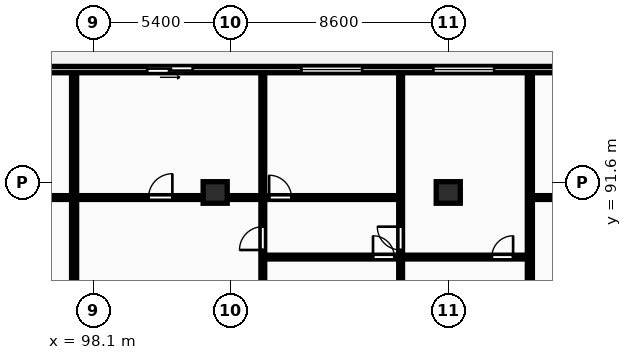
"""IFC4 building model, lengths in metres.
Left out: names, types, materials, properties, quantities, classifications, styles, units other than length and angle.
Written with IfcOpenShell. Run it as: python <this file> out.ifc"""

import sys

from ifc_helpers import new_model, si_unit, direction, frame, frame_2d, origin, origin_2d, place, context, subcontext, project, spatial, rectangle, extrude, element, fill, save


model = new_model("IFC4")
c1 = context("Model", 3, precision=1e-05, world=origin(), true_north=direction((0.0, 1.0)))
c2 = subcontext(c1, "Body", "Model", "MODEL_VIEW")
j1 = project(units=[si_unit("LENGTHUNIT", "METRE"), si_unit("PLANEANGLEUNIT", "RADIAN")], contexts=[c1])
p1 = place(None, origin())
s1 = spatial("IfcSite", under=j1, at=p1, CompositionType="ELEMENT")
p2 = place(p1, origin())
s2 = spatial("IfcBuilding", under=s1, at=p2, CompositionType="ELEMENT")
p3 = place(p2, frame((0.0, 0.0, 119.8)))
s3 = spatial("IfcBuildingStorey", under=s2, at=p3, CompositionType="ELEMENT", Elevation=119.8)
for number, where, z_axis, x_axis in (
    (1, (102.9, 91.2, 0.0), (0.0, 0.0, 1.0), (1.0, 0.0, 0.0)),
    (2, (112.1, 91.2, 0.0), (0.0, 0.0, 1.0), (1.0, 0.0, 0.0)),
):
    element("IfcColumn", number, at=place(p3, frame(where, z_axis=z_axis, x_axis=x_axis)), inside=s3, PredefinedType="COLUMN", context=c2, shape_type="SweptSolid", body=[
        extrude(rectangle(XDim=0.95, YDim=0.85, at=origin_2d()), origin(), (0.0, 0.0, 1.0), 3.25),
    ])
p4 = place(p3, frame((130.6, 96.05, 0.0), z_axis=(0.0, 0.0, 1.0), x_axis=(-1.0, 0.0, 0.0)))
e3 = element("IfcWall", 3, at=p4, inside=s3, PredefinedType="STANDARD", context=c2, shape_type="SweptSolid", body=[
    extrude(rectangle(XDim=73.0, YDim=0.25, at=frame_2d((36.5, 0.0))), origin(), (0.0, 0.0, 1.0), 2.97),
])
p5 = place(p4, frame((67.772, 0.0, 0.0)))
e4 = element("IfcOpeningElement", 4, at=p5, cuts=e3, PredefinedType="OPENING", context=c2, shape_type="SweptSolid", body=[
    extrude(rectangle(XDim=1.8, YDim=2.2, at=frame_2d((0.9, 1.1))), frame((0.0, 0.135, 0.0), z_axis=(0.0, -1.0, 0.0), x_axis=(1.0, 0.0, 0.0)), (0.0, 0.0, 1.0), 0.27),
])
p6 = place(p4, frame((57.637, 0.0, 0.85)))
e5 = element("IfcOpeningElement", 5, at=p6, cuts=e3, PredefinedType="OPENING", context=c2, shape_type="SweptSolid", body=[
    extrude(rectangle(XDim=2.4, YDim=1.9, at=frame_2d((1.2, 0.95))), frame((0.0, 0.135, 0.0), z_axis=(0.0, -1.0, 0.0), x_axis=(1.0, 0.0, 0.0)), (0.0, 0.0, 1.0), 0.27),
])
p7 = place(p4, frame((47.827, 0.0, 0.0)))
e6 = element("IfcOpeningElement", 6, at=p7, cuts=e3, PredefinedType="OPENING", context=c2, shape_type="SweptSolid", body=[
    extrude(rectangle(XDim=1.8, YDim=2.2, at=frame_2d((0.9, 1.1))), frame((0.0, 0.135, 0.0), z_axis=(0.0, -1.0, 0.0), x_axis=(1.0, 0.0, 0.0)), (0.0, 0.0, 1.0), 0.27),
])
p8 = place(p4, frame((37.736, 0.0, 0.85)))
e7 = element("IfcOpeningElement", 7, at=p8, cuts=e3, PredefinedType="OPENING", context=c2, shape_type="SweptSolid", body=[
    extrude(rectangle(XDim=2.4, YDim=1.9, at=frame_2d((1.2, 0.95))), frame((0.0, 0.135, 0.0), z_axis=(0.0, -1.0, 0.0), x_axis=(1.0, 0.0, 0.0)), (0.0, 0.0, 1.0), 0.27),
])
p9 = place(p4, frame((21.9, 0.0, 0.85)))
e8 = element("IfcOpeningElement", 8, at=p9, cuts=e3, PredefinedType="OPENING", context=c2, shape_type="SweptSolid", body=[
    extrude(rectangle(XDim=2.4, YDim=1.9, at=frame_2d((1.2, 0.95))), frame((0.0, 0.135, 0.0), z_axis=(0.0, -1.0, 0.0), x_axis=(1.0, 0.0, 0.0)), (0.0, 0.0, 1.0), 0.27),
])
p10 = place(p4, frame((28.584, 0.0, 0.0)))
e9 = element("IfcOpeningElement", 9, at=p10, cuts=e3, PredefinedType="OPENING", context=c2, shape_type="SweptSolid", body=[
    extrude(rectangle(XDim=1.8, YDim=2.2, at=frame_2d((0.9, 1.1))), frame((0.0, 0.135, 0.0), z_axis=(0.0, -1.0, 0.0), x_axis=(1.0, 0.0, 0.0)), (0.0, 0.0, 1.0), 0.27),
])
p11 = place(p4, frame((16.689, 0.0, 0.85)))
e10 = element("IfcOpeningElement", 10, at=p11, cuts=e3, PredefinedType="OPENING", context=c2, shape_type="SweptSolid", body=[
    extrude(rectangle(XDim=2.4, YDim=1.9, at=frame_2d((1.2, 0.95))), frame((0.0, 0.135, 0.0), z_axis=(0.0, -1.0, 0.0), x_axis=(1.0, 0.0, 0.0)), (0.0, 0.0, 1.0), 0.27),
])
p12 = place(p4, frame((5.475, 0.0, 0.85)))
e11 = element("IfcOpeningElement", 11, at=p12, cuts=e3, PredefinedType="OPENING", context=c2, shape_type="SweptSolid", body=[
    extrude(rectangle(XDim=1.8, YDim=1.8, at=frame_2d((0.9, 0.9))), frame((0.0, 0.135, 0.0), z_axis=(0.0, -1.0, 0.0), x_axis=(1.0, 0.0, 0.0)), (0.0, 0.0, 1.0), 0.27),
])
p13 = place(p4, frame((10.889, 0.0, 0.0)))
e12 = element("IfcOpeningElement", 12, at=p13, cuts=e3, PredefinedType="OPENING", context=c2, shape_type="SweptSolid", body=[
    extrude(rectangle(XDim=1.8, YDim=2.2, at=frame_2d((0.9, 1.1))), frame((0.0, 0.135, 0.0), z_axis=(0.0, -1.0, 0.0), x_axis=(1.0, 0.0, 0.0)), (0.0, 0.0, 1.0), 0.27),
])
p14 = place(p4, frame((1.025, 0.0, 0.85)))
e13 = element("IfcOpeningElement", 13, at=p14, cuts=e3, PredefinedType="OPENING", context=c2, shape_type="SweptSolid", body=[
    extrude(rectangle(XDim=2.4, YDim=1.9, at=frame_2d((1.2, 0.95))), frame((0.0, 0.135, 0.0), z_axis=(0.0, -1.0, 0.0), x_axis=(1.0, 0.0, 0.0)), (0.0, 0.0, 1.0), 0.27),
])
p15 = place(p3, frame((97.332, 69.83, 0.0), z_axis=(0.0, 0.0, 1.0), x_axis=(0.0, 1.0, 0.0)))
e14 = element("IfcWall", 14, at=p15, inside=s3, PredefinedType="PARTITIONING", context=c2, shape_type="SweptSolid", body=[
    extrude(rectangle(XDim=26.07, YDim=0.2, at=frame_2d((13.035, 0.0))), origin(), (0.0, 0.0, 1.0), 2.97),
])
p16 = place(p3, frame((77.591, 91.0, 0.0), z_axis=(0.0, 0.0, 1.0), x_axis=(1.0, 0.0, 0.0)))
e15 = element("IfcWall", 15, at=p16, inside=s3, PredefinedType="PARTITIONING", context=c2, shape_type="SweptSolid", body=[
    extrude(rectangle(XDim=19.661, YDim=0.15, at=frame_2d((9.831, 0.0))), origin(), (0.0, 0.0, 1.0), 2.663),
])
p17 = place(p16, frame((4.218, 0.0, 0.0)))
e16 = element("IfcOpeningElement", 16, at=p17, cuts=e15, PredefinedType="OPENING", context=c2, shape_type="SweptSolid", body=[
    extrude(rectangle(XDim=0.94, YDim=2.1, at=frame_2d((0.47, 1.05))), frame((0.0, 0.085, 0.0), z_axis=(0.0, -1.0, 0.0), x_axis=(1.0, 0.0, 0.0)), (0.0, 0.0, 1.0), 0.17),
])
p18 = place(p16, frame((9.361, 0.0, 0.0)))
e17 = element("IfcOpeningElement", 17, at=p18, cuts=e15, PredefinedType="OPENING", context=c2, shape_type="SweptSolid", body=[
    extrude(rectangle(XDim=0.94, YDim=2.1, at=frame_2d((0.47, 1.05))), frame((0.0, 0.085, 0.0), z_axis=(0.0, -1.0, 0.0), x_axis=(1.0, 0.0, 0.0)), (0.0, 0.0, 1.0), 0.17),
])
p19 = place(p3, frame((115.321, 69.83, 0.0), z_axis=(0.0, 0.0, 1.0), x_axis=(0.0, 1.0, 0.0)))
e18 = element("IfcWall", 18, at=p19, inside=s3, PredefinedType="PARTITIONING", context=c2, shape_type="SweptSolid", body=[
    extrude(rectangle(XDim=26.07, YDim=0.2, at=frame_2d((13.035, 0.0))), origin(), (0.0, 0.0, 1.0), 2.97),
])
p20 = place(p3, frame((104.78, 85.94, 0.0), z_axis=(0.0, 0.0, 1.0), x_axis=(0.0, 1.0, 0.0)))
e19 = element("IfcWall", 19, at=p20, inside=s3, PredefinedType="PARTITIONING", context=c2, shape_type="SweptSolid", body=[
    extrude(rectangle(XDim=9.96, YDim=0.15, at=frame_2d((4.98, 0.0))), origin(), (0.0, 0.0, 1.0), 2.97),
])
p21 = place(p20, frame((2.99, 0.0, 0.0)))
e20 = element("IfcOpeningElement", 20, at=p21, cuts=e19, PredefinedType="OPENING", context=c2, shape_type="SweptSolid", body=[
    extrude(rectangle(XDim=0.92, YDim=2.08, at=frame_2d((0.46, 1.04))), frame((0.0, 0.085, 0.0), z_axis=(0.0, -1.0, 0.0), x_axis=(1.0, 0.0, 0.0)), (0.0, 0.0, 1.0), 0.17),
])
p22 = place(p3, frame((110.22, 85.94, 0.0), z_axis=(0.0, 0.0, 1.0), x_axis=(0.0, 1.0, 0.0)))
e21 = element("IfcWall", 21, at=p22, inside=s3, PredefinedType="PARTITIONING", context=c2, shape_type="SweptSolid", body=[
    extrude(rectangle(XDim=2.69, YDim=0.15, at=frame_2d((1.345, 0.0))), origin(), (0.0, 0.0, 1.0), 2.97),
])
p23 = place(p3, frame((110.22, 88.67, 0.0), z_axis=(0.0, 0.0, 1.0), x_axis=(0.0, 1.0, 0.0)))
e22 = element("IfcWall", 22, at=p23, inside=s3, PredefinedType="PARTITIONING", context=c2, shape_type="SweptSolid", body=[
    extrude(rectangle(XDim=7.23, YDim=0.15, at=frame_2d((3.615, 0.0))), origin(), (0.0, 0.0, 1.0), 2.97),
])
p24 = place(p23, frame((0.26, 0.0, 0.0)))
e23 = element("IfcOpeningElement", 23, at=p24, cuts=e22, PredefinedType="OPENING", context=c2, shape_type="SweptSolid", body=[
    extrude(rectangle(XDim=0.92, YDim=2.08, at=frame_2d((0.46, 1.04))), frame((0.0, 0.085, 0.0), z_axis=(0.0, -1.0, 0.0), x_axis=(1.0, 0.0, 0.0)), (0.0, 0.0, 1.0), 0.17),
])
p25 = place(p3, frame((104.82, 88.65, 0.0), z_axis=(0.0, 0.0, 1.0), x_axis=(1.0, 0.0, 0.0)))
e24 = element("IfcWall", 24, at=p25, inside=s3, PredefinedType="PARTITIONING", context=c2, shape_type="SweptSolid", body=[
    extrude(rectangle(XDim=10.421, YDim=0.15, at=frame_2d((5.21, 0.0))), origin(), (0.0, 0.0, 1.0), 2.97),
])
p26 = place(p25, frame((4.31, 0.0, 0.0)))
e25 = element("IfcOpeningElement", 25, at=p26, cuts=e24, PredefinedType="OPENING", context=c2, shape_type="SweptSolid", body=[
    extrude(rectangle(XDim=0.84, YDim=2.04, at=frame_2d((0.42, 1.02))), frame((0.0, 0.085, 0.0), z_axis=(0.0, -1.0, 0.0), x_axis=(1.0, 0.0, 0.0)), (0.0, 0.0, 1.0), 0.17),
])
p27 = place(p25, frame((9.0, 0.0, 0.0)))
e26 = element("IfcOpeningElement", 26, at=p27, cuts=e24, PredefinedType="OPENING", context=c2, shape_type="SweptSolid", body=[
    extrude(rectangle(XDim=0.84, YDim=2.04, at=frame_2d((0.42, 1.02))), frame((0.0, 0.085, 0.0), z_axis=(0.0, -1.0, 0.0), x_axis=(1.0, 0.0, 0.0)), (0.0, 0.0, 1.0), 0.17),
])
p28 = place(p3, frame((97.412, 91.0, 0.0), z_axis=(0.0, 0.0, 1.0), x_axis=(1.0, 0.0, 0.0)))
e27 = element("IfcWall", 27, at=p28, inside=s3, PredefinedType="PARTITIONING", context=c2, shape_type="SweptSolid", body=[
    extrude(rectangle(XDim=12.808, YDim=0.15, at=frame_2d((6.404, 0.0))), origin(), (0.0, 0.0, 1.0), 2.663),
])
p29 = place(p28, frame((2.858, 0.0, 0.0)))
e28 = element("IfcOpeningElement", 28, at=p29, cuts=e27, PredefinedType="OPENING", context=c2, shape_type="SweptSolid", body=[
    extrude(rectangle(XDim=0.94, YDim=2.1, at=frame_2d((0.47, 1.05))), frame((0.0, 0.085, 0.0), z_axis=(0.0, -1.0, 0.0), x_axis=(1.0, 0.0, 0.0)), (0.0, 0.0, 1.0), 0.17),
])
p30 = place(p28, frame((7.618, 0.0, 0.0)))
e29 = element("IfcOpeningElement", 29, at=p30, cuts=e27, PredefinedType="OPENING", context=c2, shape_type="SweptSolid", body=[
    extrude(rectangle(XDim=0.88, YDim=2.06, at=frame_2d((0.44, 1.03))), frame((0.0, 0.085, 0.0), z_axis=(0.0, -1.0, 0.0), x_axis=(1.0, 0.0, 0.0)), (0.0, 0.0, 1.0), 0.17),
])
p31 = place(p3, frame((115.401, 91.0, 0.0), z_axis=(0.0, 0.0, 1.0), x_axis=(1.0, 0.0, 0.0)))
e30 = element("IfcWall", 30, at=p31, inside=s3, PredefinedType="PARTITIONING", context=c2, shape_type="SweptSolid", body=[
    extrude(rectangle(XDim=10.869, YDim=0.15, at=frame_2d((5.435, 0.0))), origin(), (0.0, 0.0, 1.0), 2.663),
])
p32 = place(p31, frame((2.279, 0.0, 0.0)))
e31 = element("IfcOpeningElement", 31, at=p32, cuts=e30, PredefinedType="OPENING", context=c2, shape_type="SweptSolid", body=[
    extrude(rectangle(XDim=0.94, YDim=2.1, at=frame_2d((0.47, 1.05))), frame((0.0, 0.085, 0.0), z_axis=(0.0, -1.0, 0.0), x_axis=(1.0, 0.0, 0.0)), (0.0, 0.0, 1.0), 0.17),
])
p33 = place(p31, frame((7.029, 0.0, 0.0)))
e32 = element("IfcOpeningElement", 32, at=p33, cuts=e30, PredefinedType="OPENING", context=c2, shape_type="SweptSolid", body=[
    extrude(rectangle(XDim=0.88, YDim=2.06, at=frame_2d((0.44, 1.03))), frame((0.0, 0.085, 0.0), z_axis=(0.0, -1.0, 0.0), x_axis=(1.0, 0.0, 0.0)), (0.0, 0.0, 1.0), 0.17),
])
p34 = place(p9, origin())
e33 = element("IfcWindow", 33, at=p34, inside=s3, PartitioningType="DOUBLE_PANEL_VERTICAL", PredefinedType="WINDOW", context=c2, shape_type="SweptSolid", body=[
    extrude(rectangle(XDim=2.4, YDim=1.9, at=frame_2d((1.2, 0.95))), frame((0.0, 0.03, 0.0), z_axis=(0.0, -1.0, 0.0), x_axis=(1.0, 0.0, 0.0)), (0.0, 0.0, 1.0), 0.06),
])
fill(e8, e33)
p35 = place(p10, origin())
e34 = element("IfcDoor", 34, at=p35, inside=s3, OperationType="SLIDING_TO_LEFT", PredefinedType="DOOR", context=c2, shape_type="SweptSolid", body=[
    extrude(rectangle(XDim=1.8, YDim=2.2, at=frame_2d((0.9, 1.1))), frame((0.0, 0.025, 0.0), z_axis=(0.0, -1.0, 0.0), x_axis=(1.0, 0.0, 0.0)), (0.0, 0.0, 1.0), 0.05),
])
fill(e9, e34)
p36 = place(p11, origin())
e35 = element("IfcWindow", 35, at=p36, inside=s3, PartitioningType="DOUBLE_PANEL_VERTICAL", PredefinedType="WINDOW", context=c2, shape_type="SweptSolid", body=[
    extrude(rectangle(XDim=2.4, YDim=1.9, at=frame_2d((1.2, 0.95))), frame((0.0, 0.03, 0.0), z_axis=(0.0, -1.0, 0.0), x_axis=(1.0, 0.0, 0.0)), (0.0, 0.0, 1.0), 0.06),
])
fill(e10, e35)
p37 = place(p21, origin())
e36 = element("IfcDoor", 36, at=p37, inside=s3, OperationType="SINGLE_SWING_LEFT", PredefinedType="DOOR", context=c2, shape_type="SweptSolid", body=[
    extrude(rectangle(XDim=0.92, YDim=2.08, at=frame_2d((0.46, 1.04))), frame((0.0, 0.025, 0.0), z_axis=(0.0, -1.0, 0.0), x_axis=(1.0, 0.0, 0.0)), (0.0, 0.0, 1.0), 0.05),
])
fill(e20, e36)
p38 = place(p24, origin())
e37 = element("IfcDoor", 37, at=p38, inside=s3, OperationType="SINGLE_SWING_RIGHT", PredefinedType="DOOR", context=c2, shape_type="SweptSolid", body=[
    extrude(rectangle(XDim=0.92, YDim=2.08, at=frame_2d((0.46, 1.04))), frame((0.0, 0.025, 0.0), z_axis=(0.0, -1.0, 0.0), x_axis=(1.0, 0.0, 0.0)), (0.0, 0.0, 1.0), 0.05),
])
fill(e23, e37)
p39 = place(p26, origin())
e38 = element("IfcDoor", 38, at=p39, inside=s3, OperationType="SINGLE_SWING_LEFT", PredefinedType="DOOR", context=c2, shape_type="SweptSolid", body=[
    extrude(rectangle(XDim=0.84, YDim=2.04, at=frame_2d((0.42, 1.02))), frame((0.0, 0.025, 0.0), z_axis=(0.0, -1.0, 0.0), x_axis=(1.0, 0.0, 0.0)), (0.0, 0.0, 1.0), 0.05),
])
fill(e25, e38)
p40 = place(p27, origin())
e39 = element("IfcDoor", 39, at=p40, inside=s3, OperationType="SINGLE_SWING_RIGHT", PredefinedType="DOOR", context=c2, shape_type="SweptSolid", body=[
    extrude(rectangle(XDim=0.84, YDim=2.04, at=frame_2d((0.42, 1.02))), frame((0.0, 0.025, 0.0), z_axis=(0.0, -1.0, 0.0), x_axis=(1.0, 0.0, 0.0)), (0.0, 0.0, 1.0), 0.05),
])
fill(e26, e39)
p41 = place(p29, origin())
e40 = element("IfcDoor", 40, at=p41, inside=s3, OperationType="SINGLE_SWING_RIGHT", PredefinedType="DOOR", context=c2, shape_type="SweptSolid", body=[
    extrude(rectangle(XDim=0.94, YDim=2.1, at=frame_2d((0.47, 1.05))), frame((0.0, 0.025, 0.0), z_axis=(0.0, -1.0, 0.0), x_axis=(1.0, 0.0, 0.0)), (0.0, 0.0, 1.0), 0.05),
])
fill(e28, e40)
p42 = place(p30, origin())
e41 = element("IfcDoor", 41, at=p42, inside=s3, OperationType="SINGLE_SWING_LEFT", PredefinedType="DOOR", context=c2, shape_type="SweptSolid", body=[
    extrude(rectangle(XDim=0.88, YDim=2.06, at=frame_2d((0.44, 1.03))), frame((0.0, 0.025, 0.0), z_axis=(0.0, -1.0, 0.0), x_axis=(1.0, 0.0, 0.0)), (0.0, 0.0, 1.0), 0.05),
])
fill(e29, e41)
save(model, sys.argv[1])
